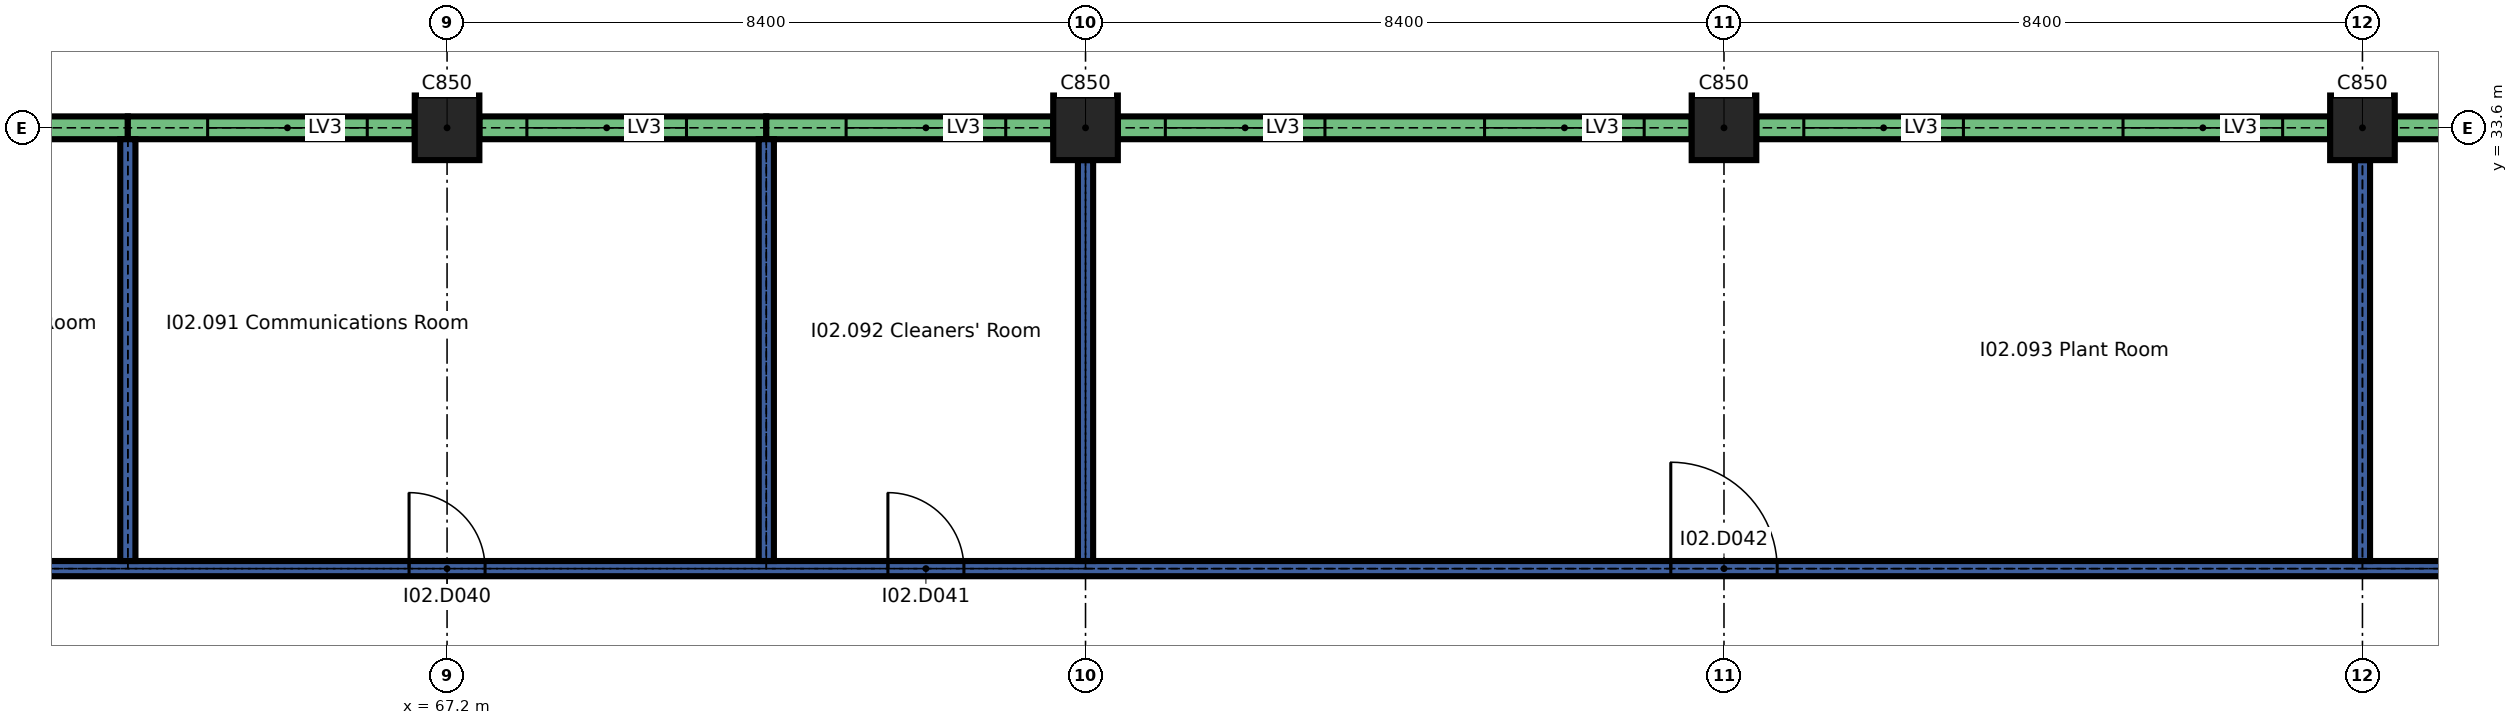
"""IFC4 building model, lengths in metres.
Left out: names, types, materials, properties, quantities, classifications, styles, units other than length and angle.
Written with IfcOpenShell. Run it as: python <this file> out.ifc"""

import sys

from ifc_helpers import new_model, si_unit, direction, frame, frame_2d, origin, origin_2d, place, context, subcontext, project, spatial, rectangle, extrude, element, fill, save


model = new_model("IFC4")
c1 = context("Model", 3, precision=1e-05, world=origin(), true_north=direction((0.0, 1.0)))
c2 = subcontext(c1, "Body", "Model", "MODEL_VIEW")
j1 = project(units=[si_unit("LENGTHUNIT", "METRE"), si_unit("PLANEANGLEUNIT", "RADIAN")], contexts=[c1])
p1 = place(None, origin())
s1 = spatial("IfcSite", under=j1, at=p1, CompositionType="ELEMENT")
p2 = place(p1, origin())
s2 = spatial("IfcBuilding", under=s1, at=p2, CompositionType="ELEMENT")
p3 = place(p2, frame((0.0, 0.0, 12.9)))
s3 = spatial("IfcBuildingStorey", under=s2, at=p3, CompositionType="ELEMENT", Elevation=12.9)
for number, where, z_axis, x_axis in (
    (1, (67.2, 33.6, 0.0), (0.0, 0.0, 1.0), (1.0, 0.0, 0.0)),
    (2, (75.6, 33.6, 0.0), (0.0, 0.0, 1.0), (1.0, 0.0, 0.0)),
    (3, (84.0, 33.6, 0.0), (0.0, 0.0, 1.0), (1.0, 0.0, 0.0)),
    (4, (92.4, 33.6, 0.0), (0.0, 0.0, 1.0), (1.0, 0.0, 0.0)),
):
    element("IfcColumn", number, at=place(p3, frame(where, z_axis=z_axis, x_axis=x_axis)), inside=s3, PredefinedType="COLUMN", context=c2, shape_type="SweptSolid", body=[
        extrude(rectangle(XDim=0.85, YDim=0.85, at=origin_2d()), origin(), (0.0, 0.0, 1.0), 2.04),
    ])
p4 = place(p3, frame((59.225, 33.6, 0.0), z_axis=(0.0, 0.0, 1.0), x_axis=(1.0, 0.0, 0.0)))
e5 = element("IfcWall", 5, at=p4, inside=s3, PredefinedType="SOLIDWALL", context=c2, shape_type="SweptSolid", body=[
    extrude(rectangle(XDim=3.775, YDim=0.3, at=frame_2d((1.887, 0.0))), origin(), (0.0, 0.0, 1.0), 1.74),
])
p5 = place(p4, frame((0.625, 0.0, 0.6)))
e6 = element("IfcOpeningElement", 6, at=p5, cuts=e5, PredefinedType="OPENING", context=c2, shape_type="SweptSolid", body=[
    extrude(rectangle(XDim=2.1, YDim=1.05, at=frame_2d((1.05, 0.525))), frame((0.0, 0.16, 0.0), z_axis=(0.0, -1.0, 0.0), x_axis=(1.0, 0.0, 0.0)), (0.0, 0.0, 1.0), 0.32),
])
p6 = place(p3, frame((63.0, 33.6, 0.0), z_axis=(0.0, 0.0, 1.0), x_axis=(1.0, 0.0, 0.0)))
e7 = element("IfcWall", 7, at=p6, inside=s3, PredefinedType="SOLIDWALL", context=c2, shape_type="SweptSolid", body=[
    extrude(rectangle(XDim=3.775, YDim=0.3, at=frame_2d((1.887, 0.0))), origin(), (0.0, 0.0, 1.0), 1.74),
])
p7 = place(p6, frame((1.05, 0.0, 0.6)))
e8 = element("IfcOpeningElement", 8, at=p7, cuts=e7, PredefinedType="OPENING", context=c2, shape_type="SweptSolid", body=[
    extrude(rectangle(XDim=2.1, YDim=1.05, at=frame_2d((1.05, 0.525))), frame((0.0, 0.16, 0.0), z_axis=(0.0, -1.0, 0.0), x_axis=(1.0, 0.0, 0.0)), (0.0, 0.0, 1.0), 0.32),
])
p8 = place(p3, frame((67.625, 33.6, 0.0), z_axis=(0.0, 0.0, 1.0), x_axis=(1.0, 0.0, 0.0)))
e9 = element("IfcWall", 9, at=p8, inside=s3, PredefinedType="SOLIDWALL", context=c2, shape_type="SweptSolid", body=[
    extrude(rectangle(XDim=3.775, YDim=0.3, at=frame_2d((1.887, 0.0))), origin(), (0.0, 0.0, 1.0), 1.74),
])
p9 = place(p8, frame((0.625, 0.0, 0.6)))
e10 = element("IfcOpeningElement", 10, at=p9, cuts=e9, PredefinedType="OPENING", context=c2, shape_type="SweptSolid", body=[
    extrude(rectangle(XDim=2.1, YDim=1.05, at=frame_2d((1.05, 0.525))), frame((0.0, 0.16, 0.0), z_axis=(0.0, -1.0, 0.0), x_axis=(1.0, 0.0, 0.0)), (0.0, 0.0, 1.0), 0.32),
])
p10 = place(p3, frame((71.4, 33.6, 0.0), z_axis=(0.0, 0.0, 1.0), x_axis=(1.0, 0.0, 0.0)))
e11 = element("IfcWall", 11, at=p10, inside=s3, PredefinedType="SOLIDWALL", context=c2, shape_type="SweptSolid", body=[
    extrude(rectangle(XDim=3.775, YDim=0.3, at=frame_2d((1.888, 0.0))), origin(), (0.0, 0.0, 1.0), 1.74),
])
p11 = place(p10, frame((1.05, 0.0, 0.6)))
e12 = element("IfcOpeningElement", 12, at=p11, cuts=e11, PredefinedType="OPENING", context=c2, shape_type="SweptSolid", body=[
    extrude(rectangle(XDim=2.1, YDim=1.05, at=frame_2d((1.05, 0.525))), frame((0.0, 0.16, 0.0), z_axis=(0.0, -1.0, 0.0), x_axis=(1.0, 0.0, 0.0)), (0.0, 0.0, 1.0), 0.32),
])
p12 = place(p3, frame((76.025, 33.6, 0.0), z_axis=(0.0, 0.0, 1.0), x_axis=(1.0, 0.0, 0.0)))
e13 = element("IfcWall", 13, at=p12, inside=s3, PredefinedType="SOLIDWALL", context=c2, shape_type="SweptSolid", body=[
    extrude(rectangle(XDim=7.55, YDim=0.3, at=frame_2d((3.775, 0.0))), origin(), (0.0, 0.0, 1.0), 1.74),
])
p13 = place(p12, frame((0.625, 0.0, 0.6)))
e14 = element("IfcOpeningElement", 14, at=p13, cuts=e13, PredefinedType="OPENING", context=c2, shape_type="SweptSolid", body=[
    extrude(rectangle(XDim=2.1, YDim=1.05, at=frame_2d((1.05, 0.525))), frame((0.0, 0.16, 0.0), z_axis=(0.0, -1.0, 0.0), x_axis=(1.0, 0.0, 0.0)), (0.0, 0.0, 1.0), 0.32),
])
p14 = place(p12, frame((4.825, 0.0, 0.6)))
e15 = element("IfcOpeningElement", 15, at=p14, cuts=e13, PredefinedType="OPENING", context=c2, shape_type="SweptSolid", body=[
    extrude(rectangle(XDim=2.1, YDim=1.05, at=frame_2d((1.05, 0.525))), frame((0.0, 0.16, 0.0), z_axis=(0.0, -1.0, 0.0), x_axis=(1.0, 0.0, 0.0)), (0.0, 0.0, 1.0), 0.32),
])
p15 = place(p3, frame((84.425, 33.6, 0.0), z_axis=(0.0, 0.0, 1.0), x_axis=(1.0, 0.0, 0.0)))
e16 = element("IfcWall", 16, at=p15, inside=s3, PredefinedType="SOLIDWALL", context=c2, shape_type="SweptSolid", body=[
    extrude(rectangle(XDim=7.55, YDim=0.3, at=frame_2d((3.775, 0.0))), origin(), (0.0, 0.0, 1.0), 1.74),
])
p16 = place(p15, frame((0.625, 0.0, 0.6)))
e17 = element("IfcOpeningElement", 17, at=p16, cuts=e16, PredefinedType="OPENING", context=c2, shape_type="SweptSolid", body=[
    extrude(rectangle(XDim=2.1, YDim=1.05, at=frame_2d((1.05, 0.525))), frame((0.0, 0.16, 0.0), z_axis=(0.0, -1.0, 0.0), x_axis=(1.0, 0.0, 0.0)), (0.0, 0.0, 1.0), 0.32),
])
p17 = place(p15, frame((4.825, 0.0, 0.6)))
e18 = element("IfcOpeningElement", 18, at=p17, cuts=e16, PredefinedType="OPENING", context=c2, shape_type="SweptSolid", body=[
    extrude(rectangle(XDim=2.1, YDim=1.05, at=frame_2d((1.05, 0.525))), frame((0.0, 0.16, 0.0), z_axis=(0.0, -1.0, 0.0), x_axis=(1.0, 0.0, 0.0)), (0.0, 0.0, 1.0), 0.32),
])
p18 = place(p3, frame((92.825, 33.6, 0.0), z_axis=(0.0, 0.0, 1.0), x_axis=(1.0, 0.0, 0.0)))
e19 = element("IfcWall", 19, at=p18, inside=s3, PredefinedType="SOLIDWALL", context=c2, shape_type="SweptSolid", body=[
    extrude(rectangle(XDim=7.55, YDim=0.3, at=frame_2d((3.775, 0.0))), origin(), (0.0, 0.0, 1.0), 1.74),
])
p19 = place(p18, frame((0.625, 0.0, 0.6)))
e20 = element("IfcOpeningElement", 20, at=p19, cuts=e19, PredefinedType="OPENING", context=c2, shape_type="SweptSolid", body=[
    extrude(rectangle(XDim=2.1, YDim=1.05, at=frame_2d((1.05, 0.525))), frame((0.0, 0.16, 0.0), z_axis=(0.0, -1.0, 0.0), x_axis=(1.0, 0.0, 0.0)), (0.0, 0.0, 1.0), 0.32),
])
p20 = place(p18, frame((4.825, 0.0, 0.6)))
e21 = element("IfcOpeningElement", 21, at=p20, cuts=e19, PredefinedType="OPENING", context=c2, shape_type="SweptSolid", body=[
    extrude(rectangle(XDim=2.1, YDim=1.05, at=frame_2d((1.05, 0.525))), frame((0.0, 0.16, 0.0), z_axis=(0.0, -1.0, 0.0), x_axis=(1.0, 0.0, 0.0)), (0.0, 0.0, 1.0), 0.32),
])
p21 = place(p3, frame((42.1, 27.8, 0.0), z_axis=(0.0, 0.0, 1.0), x_axis=(1.0, 0.0, 0.0)))
e22 = element("IfcWall", 22, at=p21, inside=s3, PredefinedType="SOLIDWALL", context=c2, shape_type="SweptSolid", body=[
    extrude(rectangle(XDim=64.1, YDim=0.2, at=frame_2d((32.05, 0.0))), origin(), (0.0, 0.0, 1.0), 2.1),
])
p22 = place(p21, frame((5.55, 0.0, 0.0)))
e23 = element("IfcOpeningElement", 23, at=p22, cuts=e22, PredefinedType="OPENING", context=c2, shape_type="SweptSolid", body=[
    extrude(rectangle(XDim=1.4, YDim=2.0, at=frame_2d((0.7, 1.0))), frame((0.0, 0.11, 0.0), z_axis=(0.0, -1.0, 0.0), x_axis=(1.0, 0.0, 0.0)), (0.0, 0.0, 1.0), 0.22),
])
p23 = place(p21, frame((16.2, 0.0, 0.0)))
e24 = element("IfcOpeningElement", 24, at=p23, cuts=e22, PredefinedType="OPENING", context=c2, shape_type="SweptSolid", body=[
    extrude(rectangle(XDim=1.0, YDim=2.0, at=frame_2d((0.5, 1.0))), frame((0.0, 0.11, 0.0), z_axis=(0.0, -1.0, 0.0), x_axis=(1.0, 0.0, 0.0)), (0.0, 0.0, 1.0), 0.22),
])
p24 = place(p21, frame((24.6, 0.0, 0.0)))
e25 = element("IfcOpeningElement", 25, at=p24, cuts=e22, PredefinedType="OPENING", context=c2, shape_type="SweptSolid", body=[
    extrude(rectangle(XDim=1.0, YDim=2.0, at=frame_2d((0.5, 1.0))), frame((0.0, 0.11, 0.0), z_axis=(0.0, -1.0, 0.0), x_axis=(1.0, 0.0, 0.0)), (0.0, 0.0, 1.0), 0.22),
])
p25 = place(p21, frame((30.9, 0.0, 0.0)))
e26 = element("IfcOpeningElement", 26, at=p25, cuts=e22, PredefinedType="OPENING", context=c2, shape_type="SweptSolid", body=[
    extrude(rectangle(XDim=1.0, YDim=2.0, at=frame_2d((0.5, 1.0))), frame((0.0, 0.11, 0.0), z_axis=(0.0, -1.0, 0.0), x_axis=(1.0, 0.0, 0.0)), (0.0, 0.0, 1.0), 0.22),
])
p26 = place(p21, frame((41.2, 0.0, 0.0)))
e27 = element("IfcOpeningElement", 27, at=p26, cuts=e22, PredefinedType="OPENING", context=c2, shape_type="SweptSolid", body=[
    extrude(rectangle(XDim=1.4, YDim=2.0, at=frame_2d((0.7, 1.0))), frame((0.0, 0.11, 0.0), z_axis=(0.0, -1.0, 0.0), x_axis=(1.0, 0.0, 0.0)), (0.0, 0.0, 1.0), 0.22),
])
p27 = place(p21, frame((54.0, 0.0, 0.0)))
e28 = element("IfcOpeningElement", 28, at=p27, cuts=e22, PredefinedType="OPENING", context=c2, shape_type="SweptSolid", body=[
    extrude(rectangle(XDim=1.0, YDim=2.0, at=frame_2d((0.5, 1.0))), frame((0.0, 0.11, 0.0), z_axis=(0.0, -1.0, 0.0), x_axis=(1.0, 0.0, 0.0)), (0.0, 0.0, 1.0), 0.22),
])
p28 = place(p21, frame((60.9, 0.0, 0.0)))
e29 = element("IfcOpeningElement", 29, at=p28, cuts=e22, PredefinedType="OPENING", context=c2, shape_type="SweptSolid", body=[
    extrude(rectangle(XDim=1.0, YDim=2.0, at=frame_2d((0.5, 1.0))), frame((0.0, 0.11, 0.0), z_axis=(0.0, -1.0, 0.0), x_axis=(1.0, 0.0, 0.0)), (0.0, 0.0, 1.0), 0.22),
])
for number, where, z_axis, x_axis in (
    (30, (63.0, 27.9, 0.0), (0.0, 0.0, 1.0), (0.0, 1.0, 0.0)),
    (31, (71.4, 27.9, 0.0), (0.0, 0.0, 1.0), (0.0, 1.0, 0.0)),
):
    element("IfcWall", number, at=place(p3, frame(where, z_axis=z_axis, x_axis=x_axis)), inside=s3, PredefinedType="SOLIDWALL", context=c2, shape_type="SweptSolid", body=[
        extrude(rectangle(XDim=5.55, YDim=0.2, at=frame_2d((2.775, 0.0))), origin(), (0.0, 0.0, 1.0), 2.1),
    ])
for number, where, z_axis, x_axis in (
    (32, (75.6, 27.9, 0.0), (0.0, 0.0, 1.0), (0.0, 1.0, 0.0)),
    (33, (92.4, 27.9, 0.0), (0.0, 0.0, 1.0), (0.0, 1.0, 0.0)),
):
    element("IfcWall", number, at=place(p3, frame(where, z_axis=z_axis, x_axis=x_axis)), inside=s3, PredefinedType="SOLIDWALL", context=c2, shape_type="SweptSolid", body=[
        extrude(rectangle(XDim=5.275, YDim=0.2, at=frame_2d((2.638, 0.0))), origin(), (0.0, 0.0, 1.0), 2.1),
    ])
p29 = place(p7, origin())
e34 = element("IfcWindow", 34, at=p29, inside=s3, PartitioningType="SINGLE_PANEL", PredefinedType="WINDOW", context=c2, shape_type="SweptSolid", body=[
    extrude(rectangle(XDim=2.1, YDim=1.05, at=frame_2d((1.05, 0.525))), frame((0.0, 0.075, 0.0), z_axis=(0.0, -1.0, 0.0), x_axis=(1.0, 0.0, 0.0)), (0.0, 0.0, 1.0), 0.15),
])
fill(e8, e34)
p30 = place(p9, origin())
e35 = element("IfcWindow", 35, at=p30, inside=s3, PartitioningType="SINGLE_PANEL", PredefinedType="WINDOW", context=c2, shape_type="SweptSolid", body=[
    extrude(rectangle(XDim=2.1, YDim=1.05, at=frame_2d((1.05, 0.525))), frame((0.0, 0.075, 0.0), z_axis=(0.0, -1.0, 0.0), x_axis=(1.0, 0.0, 0.0)), (0.0, 0.0, 1.0), 0.15),
])
fill(e10, e35)
p31 = place(p11, origin())
e36 = element("IfcWindow", 36, at=p31, inside=s3, PartitioningType="SINGLE_PANEL", PredefinedType="WINDOW", context=c2, shape_type="SweptSolid", body=[
    extrude(rectangle(XDim=2.1, YDim=1.05, at=frame_2d((1.05, 0.525))), frame((0.0, 0.075, 0.0), z_axis=(0.0, -1.0, 0.0), x_axis=(1.0, 0.0, 0.0)), (0.0, 0.0, 1.0), 0.15),
])
fill(e12, e36)
p32 = place(p13, origin())
e37 = element("IfcWindow", 37, at=p32, inside=s3, PartitioningType="SINGLE_PANEL", PredefinedType="WINDOW", context=c2, shape_type="SweptSolid", body=[
    extrude(rectangle(XDim=2.1, YDim=1.05, at=frame_2d((1.05, 0.525))), frame((0.0, 0.075, 0.0), z_axis=(0.0, -1.0, 0.0), x_axis=(1.0, 0.0, 0.0)), (0.0, 0.0, 1.0), 0.15),
])
fill(e14, e37)
p33 = place(p14, origin())
e38 = element("IfcWindow", 38, at=p33, inside=s3, PartitioningType="SINGLE_PANEL", PredefinedType="WINDOW", context=c2, shape_type="SweptSolid", body=[
    extrude(rectangle(XDim=2.1, YDim=1.05, at=frame_2d((1.05, 0.525))), frame((0.0, 0.075, 0.0), z_axis=(0.0, -1.0, 0.0), x_axis=(1.0, 0.0, 0.0)), (0.0, 0.0, 1.0), 0.15),
])
fill(e15, e38)
p34 = place(p16, origin())
e39 = element("IfcWindow", 39, at=p34, inside=s3, PartitioningType="SINGLE_PANEL", PredefinedType="WINDOW", context=c2, shape_type="SweptSolid", body=[
    extrude(rectangle(XDim=2.1, YDim=1.05, at=frame_2d((1.05, 0.525))), frame((0.0, 0.075, 0.0), z_axis=(0.0, -1.0, 0.0), x_axis=(1.0, 0.0, 0.0)), (0.0, 0.0, 1.0), 0.15),
])
fill(e17, e39)
p35 = place(p17, origin())
e40 = element("IfcWindow", 40, at=p35, inside=s3, PartitioningType="SINGLE_PANEL", PredefinedType="WINDOW", context=c2, shape_type="SweptSolid", body=[
    extrude(rectangle(XDim=2.1, YDim=1.05, at=frame_2d((1.05, 0.525))), frame((0.0, 0.075, 0.0), z_axis=(0.0, -1.0, 0.0), x_axis=(1.0, 0.0, 0.0)), (0.0, 0.0, 1.0), 0.15),
])
fill(e18, e40)
p36 = place(p24, origin())
e41 = element("IfcDoor", 41, at=p36, inside=s3, OperationType="SINGLE_SWING_RIGHT", PredefinedType="DOOR", context=c2, shape_type="SweptSolid", body=[
    extrude(rectangle(XDim=1.0, YDim=2.0, at=frame_2d((0.5, 1.0))), frame((0.0, 0.025, 0.0), z_axis=(0.0, -1.0, 0.0), x_axis=(1.0, 0.0, 0.0)), (0.0, 0.0, 1.0), 0.05),
])
fill(e25, e41)
p37 = place(p25, origin())
e42 = element("IfcDoor", 42, at=p37, inside=s3, OperationType="SINGLE_SWING_RIGHT", PredefinedType="DOOR", context=c2, shape_type="SweptSolid", body=[
    extrude(rectangle(XDim=1.0, YDim=2.0, at=frame_2d((0.5, 1.0))), frame((0.0, 0.025, 0.0), z_axis=(0.0, -1.0, 0.0), x_axis=(1.0, 0.0, 0.0)), (0.0, 0.0, 1.0), 0.05),
])
fill(e26, e42)
p38 = place(p26, origin())
e43 = element("IfcDoor", 43, at=p38, inside=s3, OperationType="SINGLE_SWING_RIGHT", PredefinedType="DOOR", context=c2, shape_type="SweptSolid", body=[
    extrude(rectangle(XDim=1.4, YDim=2.0, at=frame_2d((0.7, 1.0))), frame((0.0, 0.025, 0.0), z_axis=(0.0, -1.0, 0.0), x_axis=(1.0, 0.0, 0.0)), (0.0, 0.0, 1.0), 0.05),
])
fill(e27, e43)
save(model, sys.argv[1])
